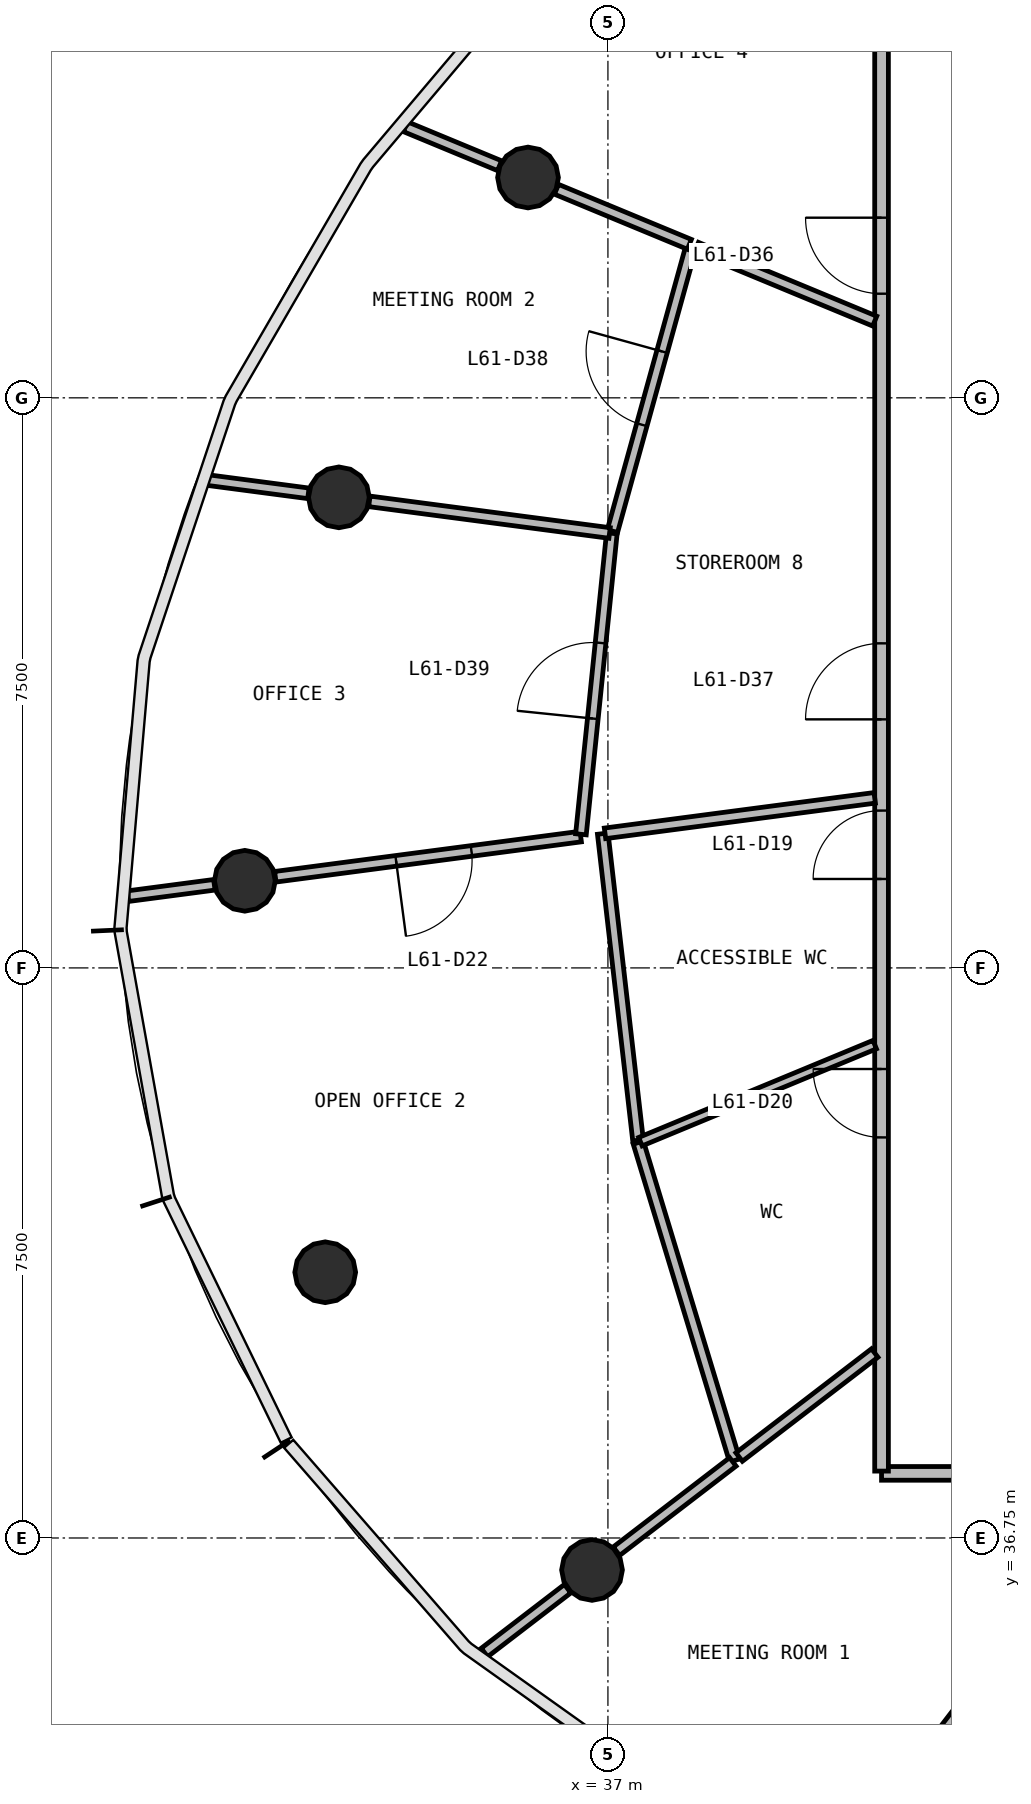
"""IFC4 building model, lengths in metres.
Left out: names, types, materials, properties, quantities, classifications, styles, units other than length and angle.
Written with IfcOpenShell. Run it as: python <this file> out.ifc"""

import sys

from ifc_helpers import new_model, si_unit, direction, frame, frame_2d, origin, origin_2d, place, context, subcontext, project, spatial, rectangle, circle, extrude, source, transform, mapped, element, fill, save


model = new_model("IFC4")
c1 = context("Model", 3, precision=1e-05, world=origin(), true_north=direction((0.0, 1.0)))
c2 = subcontext(c1, "Body", "Model", "MODEL_VIEW")
j1 = project(units=[si_unit("LENGTHUNIT", "METRE"), si_unit("PLANEANGLEUNIT", "RADIAN")], contexts=[c1])
p1 = place(None, origin())
s1 = spatial("IfcSite", under=j1, at=p1, CompositionType="ELEMENT")
p2 = place(p1, origin())
s2 = spatial("IfcBuilding", under=s1, at=p2, CompositionType="ELEMENT")
p3 = place(p2, frame((0.0, 0.0, 250.1)))
s3 = spatial("IfcBuildingStorey", under=s2, at=p3, CompositionType="ELEMENT", Elevation=250.1)
m1 = source(origin(), c2, "Body", "SweptSolid", [
    extrude(circle(Radius=0.4, at=origin_2d()), origin(), (0.0, 0.0, 1.0), 3.9),
])
for number, where, z_axis, x_axis in (
    (1, (35.948, 54.649, 0.0), (0.0, 0.0, 1.0), (1.0, 0.0, 0.0)),
    (2, (33.46, 50.441, 0.0), (0.0, 0.0, 1.0), (1.0, 0.0, 0.0)),
    (3, (32.223, 45.396, 0.0), (0.0, 0.0, 1.0), (1.0, 0.0, 0.0)),
    (4, (33.281, 40.246, 0.0), (0.0, 0.0, 1.0), (1.0, 0.0, 0.0)),
    (5, (36.791, 36.329, 0.0), (0.0, 0.0, 1.0), (1.0, 0.0, 0.0)),
):
    element("IfcColumn", number, at=place(p3, frame(where, z_axis=z_axis, x_axis=x_axis)), inside=s3, PredefinedType="COLUMN", context=c2, shape_type="MappedRepresentation", body=[
        mapped(m1, transform((0.0, 0.0, 0.0), scale=1.0)),
    ])
p4 = place(p3, frame((63.4, 37.6, 0.0), z_axis=(0.0, 0.0, 1.0), x_axis=(-1.0, 0.0, 0.0)))
e6 = element("IfcWall", 6, at=p4, inside=s3, PredefinedType="PARTITIONING", context=c2, shape_type="SweptSolid", body=[
    extrude(rectangle(XDim=22.8, YDim=0.18, at=frame_2d((11.4, 0.0))), origin(), (0.0, 0.0, 1.0), 2.88),
])
p5 = place(p4, frame((19.95, 0.0, 0.0)))
e7 = element("IfcOpeningElement", 7, at=p5, cuts=e6, PredefinedType="OPENING", context=c2, shape_type="SweptSolid", body=[
    extrude(rectangle(XDim=1.0, YDim=2.1, at=frame_2d((0.5, 1.05))), frame((0.0, 0.1, 0.0), z_axis=(0.0, -1.0, 0.0), x_axis=(1.0, 0.0, 0.0)), (0.0, 0.0, 1.0), 0.2),
])
p6 = place(p4, frame((10.95, 0.0, 0.0)))
e8 = element("IfcOpeningElement", 8, at=p6, cuts=e6, PredefinedType="OPENING", context=c2, shape_type="SweptSolid", body=[
    extrude(rectangle(XDim=1.0, YDim=2.1, at=frame_2d((0.5, 1.05))), frame((0.0, 0.1, 0.0), z_axis=(0.0, -1.0, 0.0), x_axis=(1.0, 0.0, 0.0)), (0.0, 0.0, 1.0), 0.2),
])
p7 = place(p4, frame((5.75, 0.0, 0.0)))
e9 = element("IfcOpeningElement", 9, at=p7, cuts=e6, PredefinedType="OPENING", context=c2, shape_type="SweptSolid", body=[
    extrude(rectangle(XDim=1.0, YDim=2.1, at=frame_2d((0.5, 1.05))), frame((0.0, 0.1, 0.0), z_axis=(0.0, -1.0, 0.0), x_axis=(1.0, 0.0, 0.0)), (0.0, 0.0, 1.0), 0.2),
])
p8 = place(p3, frame((40.6, 37.63, 0.0), z_axis=(0.0, 0.0, 1.0), x_axis=(0.0, 1.0, 0.0)))
e10 = element("IfcWall", 10, at=p8, inside=s3, PredefinedType="PARTITIONING", context=c2, shape_type="SweptSolid", body=[
    extrude(rectangle(XDim=20.74, YDim=0.18, at=frame_2d((10.37, 0.0))), origin(), (0.0, 0.0, 1.0), 2.88),
])
p9 = place(p8, frame((7.79, 0.0, 0.0)))
e11 = element("IfcOpeningElement", 11, at=p9, cuts=e10, PredefinedType="OPENING", context=c2, shape_type="SweptSolid", body=[
    extrude(rectangle(XDim=0.9, YDim=2.1, at=frame_2d((0.45, 1.05))), frame((0.0, 0.1, 0.0), z_axis=(0.0, -1.0, 0.0), x_axis=(1.0, 0.0, 0.0)), (0.0, 0.0, 1.0), 0.2),
])
p10 = place(p8, frame((4.39, 0.0, 0.0)))
e12 = element("IfcOpeningElement", 12, at=p10, cuts=e10, PredefinedType="OPENING", context=c2, shape_type="SweptSolid", body=[
    extrude(rectangle(XDim=0.9, YDim=2.1, at=frame_2d((0.45, 1.05))), frame((0.0, 0.1, 0.0), z_axis=(0.0, -1.0, 0.0), x_axis=(1.0, 0.0, 0.0)), (0.0, 0.0, 1.0), 0.2),
])
p11 = place(p8, frame((15.49, 0.0, 0.0)))
e13 = element("IfcOpeningElement", 13, at=p11, cuts=e10, PredefinedType="OPENING", context=c2, shape_type="SweptSolid", body=[
    extrude(rectangle(XDim=1.0, YDim=2.1, at=frame_2d((0.5, 1.05))), frame((0.0, 0.1, 0.0), z_axis=(0.0, -1.0, 0.0), x_axis=(1.0, 0.0, 0.0)), (0.0, 0.0, 1.0), 0.2),
])
p12 = place(p8, frame((9.89, 0.0, 0.0)))
e14 = element("IfcOpeningElement", 14, at=p12, cuts=e10, PredefinedType="OPENING", context=c2, shape_type="SweptSolid", body=[
    extrude(rectangle(XDim=1.0, YDim=2.1, at=frame_2d((0.5, 1.05))), frame((0.0, 0.1, 0.0), z_axis=(0.0, -1.0, 0.0), x_axis=(1.0, 0.0, 0.0)), (0.0, 0.0, 1.0), 0.2),
])
p13 = place(p3, frame((37.4, 41.952, 0.0), z_axis=(0.0, 0.0, 1.0), x_axis=(0.290001194342, -0.957026283485, 0.0)))
e15 = element("IfcWall", 15, at=p13, inside=s3, PredefinedType="PARTITIONING", context=c2, shape_type="SweptSolid", body=[
    extrude(rectangle(XDim=4.371, YDim=0.14, at=frame_2d((2.186, 0.0))), origin(), (0.0, 0.0, 1.0), 2.88),
])
p14 = place(p3, frame((43.951, 37.51, 0.0), z_axis=(0.0, 0.0, 1.0), x_axis=(-0.60875313342, -0.793359705651, 0.0)))
e16 = element("IfcWall", 16, at=p14, inside=s3, PredefinedType="PARTITIONING", context=c2, shape_type="SweptSolid", body=[
    extrude(rectangle(XDim=4.191, YDim=0.14, at=frame_2d((2.095, 0.0))), origin(), (0.0, 0.0, 1.0), 2.88),
])
p15 = place(p3, frame((36.932, 46.016, 0.0), z_axis=(0.0, 0.0, 1.0), x_axis=(0.114357097704, -0.993439708389, 0.0)))
e17 = element("IfcWall", 17, at=p15, inside=s3, PredefinedType="PARTITIONING", context=c2, shape_type="SweptSolid", body=[
    extrude(rectangle(XDim=4.061, YDim=0.14, at=frame_2d((2.03, 0.0))), origin(), (0.0, 0.0, 1.0), 2.88),
])
p16 = place(p3, frame((36.642, 45.978, 0.0), z_axis=(0.0, 0.0, 1.0), x_axis=(-0.991449578653, -0.130490355919, 0.0)))
e18 = element("IfcWall", 18, at=p16, inside=s3, PredefinedType="PARTITIONING", context=c2, shape_type="SweptSolid", body=[
    extrude(rectangle(XDim=4.052, YDim=0.14, at=frame_2d((2.026, 0.0))), origin(), (0.0, 0.0, 1.0), 2.88),
])
p17 = place(p16, frame((1.45, 0.0, 0.0)))
e19 = element("IfcOpeningElement", 19, at=p17, cuts=e18, PredefinedType="OPENING", context=c2, shape_type="SweptSolid", body=[
    extrude(rectangle(XDim=1.0, YDim=2.1, at=frame_2d((0.5, 1.05))), frame((0.0, 0.08, 0.0), z_axis=(0.0, -1.0, 0.0), x_axis=(1.0, 0.0, 0.0)), (0.0, 0.0, 1.0), 0.16),
])
p18 = place(p3, frame((36.645, 46.008, 0.0), z_axis=(0.0, 0.0, 1.0), x_axis=(0.102108226225, 0.99477329585, 0.0)))
e20 = element("IfcWall", 20, at=p18, inside=s3, PredefinedType="PARTITIONING", context=c2, shape_type="SweptSolid", body=[
    extrude(rectangle(XDim=3.981, YDim=0.14, at=frame_2d((1.99, 0.0))), origin(), (0.0, 0.0, 1.0), 2.88),
])
p19 = place(p18, frame((1.531, 0.0, 0.0)))
e21 = element("IfcOpeningElement", 21, at=p19, cuts=e20, PredefinedType="OPENING", context=c2, shape_type="SweptSolid", body=[
    extrude(rectangle(XDim=1.0, YDim=2.1, at=frame_2d((0.5, 1.05))), frame((0.0, 0.08, 0.0), z_axis=(0.0, -1.0, 0.0), x_axis=(1.0, 0.0, 0.0)), (0.0, 0.0, 1.0), 0.16),
])
p20 = place(p3, frame((37.059, 49.997, 0.0), z_axis=(0.0, 0.0, 1.0), x_axis=(0.266530407872, 0.963826510156, 0.0)))
e22 = element("IfcWall", 22, at=p20, inside=s3, PredefinedType="PARTITIONING", context=c2, shape_type="SweptSolid", body=[
    extrude(rectangle(XDim=3.902, YDim=0.14, at=frame_2d((1.951, 0.0))), origin(), (0.0, 0.0, 1.0), 2.88),
])
p21 = place(p20, frame((1.452, 0.0, 0.0)))
e23 = element("IfcOpeningElement", 23, at=p21, cuts=e22, PredefinedType="OPENING", context=c2, shape_type="SweptSolid", body=[
    extrude(rectangle(XDim=1.0, YDim=2.1, at=frame_2d((0.5, 1.05))), frame((0.0, 0.08, 0.0), z_axis=(0.0, -1.0, 0.0), x_axis=(1.0, 0.0, 0.0)), (0.0, 0.0, 1.0), 0.16),
])
p22 = place(p3, frame((40.51, 46.487, 0.0), z_axis=(0.0, 0.0, 1.0), x_axis=(-0.991448722209, -0.130496862914, 0.0)))
e24 = element("IfcWall", 24, at=p22, inside=s3, PredefinedType="PARTITIONING", context=c2, shape_type="SweptSolid", body=[
    extrude(rectangle(XDim=3.579, YDim=0.14, at=frame_2d((1.79, 0.0))), origin(), (0.0, 0.0, 1.0), 2.88),
])
p23 = place(p3, frame((37.021, 49.972, 0.0), z_axis=(0.0, 0.0, 1.0), x_axis=(-0.991447255609, 0.13050800491, 0.0)))
e25 = element("IfcWall", 25, at=p23, inside=s3, PredefinedType="PARTITIONING", context=c2, shape_type="SweptSolid", body=[
    extrude(rectangle(XDim=3.188, YDim=0.14, at=frame_2d((1.594, 0.0))), origin(), (0.0, 0.0, 1.0), 2.88),
])
p24 = place(p3, frame((40.51, 52.759, 0.0), z_axis=(0.0, 0.0, 1.0), x_axis=(-0.923857420899, 0.382736810157, 0.0)))
e26 = element("IfcWall", 26, at=p24, inside=s3, PredefinedType="PARTITIONING", context=c2, shape_type="SweptSolid", body=[
    extrude(rectangle(XDim=2.539, YDim=0.14, at=frame_2d((1.27, 0.0))), origin(), (0.0, 0.0, 1.0), 2.88),
])
p25 = place(p3, frame((40.51, 39.183, 0.0), z_axis=(0.0, 0.0, 1.0), x_axis=(-0.793370316216, -0.608739304914, 0.0)))
e27 = element("IfcWall", 27, at=p25, inside=s3, PredefinedType="PARTITIONING", context=c2, shape_type="SweptSolid", body=[
    extrude(rectangle(XDim=2.248, YDim=0.14, at=frame_2d((1.124, 0.0))), origin(), (0.0, 0.0, 1.0), 2.88),
])
p26 = place(p3, frame((38.644, 37.751, 0.0), z_axis=(0.0, 0.0, 1.0), x_axis=(-0.793351926694, -0.60876327124, 0.0)))
e28 = element("IfcWall", 28, at=p26, inside=s3, PredefinedType="PARTITIONING", context=c2, shape_type="SweptSolid", body=[
    extrude(rectangle(XDim=1.931, YDim=0.14, at=frame_2d((0.965, 0.0))), origin(), (0.0, 0.0, 1.0), 2.88),
])
p27 = place(p3, frame((38.072, 53.769, 0.0), z_axis=(0.0, 0.0, 1.0), x_axis=(-0.923834462885, 0.382792221952, 0.0)))
e29 = element("IfcWall", 29, at=p27, inside=s3, PredefinedType="PARTITIONING", context=c2, shape_type="SweptSolid", body=[
    extrude(rectangle(XDim=1.893, YDim=0.14, at=frame_2d((0.947, 0.0))), origin(), (0.0, 0.0, 1.0), 2.88),
])
p28 = place(p3, frame((36.469, 36.083, 0.0), z_axis=(0.0, 0.0, 1.0), x_axis=(-0.793347091369, -0.608769572676, 0.0)))
e30 = element("IfcWall", 30, at=p28, inside=s3, PredefinedType="PARTITIONING", context=c2, shape_type="SweptSolid", body=[
    extrude(rectangle(XDim=1.38, YDim=0.14, at=frame_2d((0.69, 0.0))), origin(), (0.0, 0.0, 1.0), 2.88),
])
p29 = place(p3, frame((33.059, 50.494, 0.0), z_axis=(0.0, 0.0, 1.0), x_axis=(-0.991453684747, 0.130459154536, 0.0)))
e31 = element("IfcWall", 31, at=p29, inside=s3, PredefinedType="PARTITIONING", context=c2, shape_type="SweptSolid", body=[
    extrude(rectangle(XDim=1.361, YDim=0.14, at=frame_2d((0.68, 0.0))), origin(), (0.0, 0.0, 1.0), 2.88),
])
p30 = place(p3, frame((35.574, 54.804, 0.0), z_axis=(0.0, 0.0, 1.0), x_axis=(-0.923888145957, 0.382662637005, 0.0)))
e32 = element("IfcWall", 32, at=p30, inside=s3, PredefinedType="PARTITIONING", context=c2, shape_type="SweptSolid", body=[
    extrude(rectangle(XDim=1.341, YDim=0.14, at=frame_2d((0.67, 0.0))), origin(), (0.0, 0.0, 1.0), 2.88),
])
p31 = place(p3, frame((31.822, 45.344, 0.0), z_axis=(0.0, 0.0, 1.0), x_axis=(-0.991431107299, -0.130630622292, 0.0)))
e33 = element("IfcWall", 33, at=p31, inside=s3, PredefinedType="PARTITIONING", context=c2, shape_type="SweptSolid", body=[
    extrude(rectangle(XDim=1.147, YDim=0.14, at=frame_2d((0.574, 0.0))), origin(), (0.0, 0.0, 1.0), 2.88),
])
p32 = place(p3, frame((40.51, 43.241, 0.0), z_axis=(0.0, 0.0, 1.0), x_axis=(-0.923886637227, -0.382666279615, 0.0)))
e34 = element("IfcWall", 34, at=p32, inside=s3, PredefinedType="PARTITIONING", context=c2, shape_type="SweptSolid", body=[
    extrude(rectangle(XDim=3.337, YDim=0.12, at=frame_2d((1.668, 0.0))), origin(), (0.0, 0.0, 1.0), 2.88),
])
m2 = source(origin(), c2, "Body", "SweptSolid", [
    extrude(rectangle(XDim=0.9, YDim=2.1, at=frame_2d((0.45, 1.05))), frame((0.0, 0.025, 0.0), z_axis=(0.0, -1.0, 0.0), x_axis=(1.0, 0.0, 0.0)), (0.0, 0.0, 1.0), 0.05),
])
p33 = place(p9, origin())
e35 = element("IfcDoor", 35, at=p33, inside=s3, OperationType="SINGLE_SWING_LEFT", PredefinedType="DOOR", context=c2, shape_type="MappedRepresentation", body=[
    mapped(m2, transform((0.0, 0.0, 0.0), scale=1.0)),
])
fill(e11, e35)
p34 = place(p10, origin())
e36 = element("IfcDoor", 36, at=p34, inside=s3, OperationType="SINGLE_SWING_RIGHT", PredefinedType="DOOR", context=c2, shape_type="MappedRepresentation", body=[
    mapped(m2, transform((0.0, 0.0, 0.0), scale=1.0)),
])
fill(e12, e36)
m3 = source(origin(), c2, "Body", "SweptSolid", [
    extrude(rectangle(XDim=1.0, YDim=2.1, at=frame_2d((0.5, 1.05))), frame((0.0, 0.025, 0.0), z_axis=(0.0, -1.0, 0.0), x_axis=(1.0, 0.0, 0.0)), (0.0, 0.0, 1.0), 0.05),
])
p35 = place(p17, origin())
e37 = element("IfcDoor", 37, at=p35, inside=s3, OperationType="SINGLE_SWING_RIGHT", PredefinedType="DOOR", context=c2, shape_type="MappedRepresentation", body=[
    mapped(m3, transform((0.0, 0.0, 0.0), scale=1.0)),
])
fill(e19, e37)
p36 = place(p11, origin())
e38 = element("IfcDoor", 38, at=p36, inside=s3, OperationType="SINGLE_SWING_RIGHT", PredefinedType="DOOR", context=c2, shape_type="MappedRepresentation", body=[
    mapped(m3, transform((0.0, 0.0, 0.0), scale=1.0)),
])
fill(e13, e38)
p37 = place(p12, origin())
e39 = element("IfcDoor", 39, at=p37, inside=s3, OperationType="SINGLE_SWING_LEFT", PredefinedType="DOOR", context=c2, shape_type="MappedRepresentation", body=[
    mapped(m3, transform((0.0, 0.0, 0.0), scale=1.0)),
])
fill(e14, e39)
p38 = place(p21, origin())
e40 = element("IfcDoor", 40, at=p38, inside=s3, OperationType="SINGLE_SWING_RIGHT", PredefinedType="DOOR", context=c2, shape_type="MappedRepresentation", body=[
    mapped(m3, transform((0.0, 0.0, 0.0), scale=1.0)),
])
fill(e23, e40)
p39 = place(p19, origin())
e41 = element("IfcDoor", 41, at=p39, inside=s3, OperationType="SINGLE_SWING_LEFT", PredefinedType="DOOR", context=c2, shape_type="MappedRepresentation", body=[
    mapped(m3, transform((0.0, 0.0, 0.0), scale=1.0)),
])
fill(e21, e41)
save(model, sys.argv[1])
